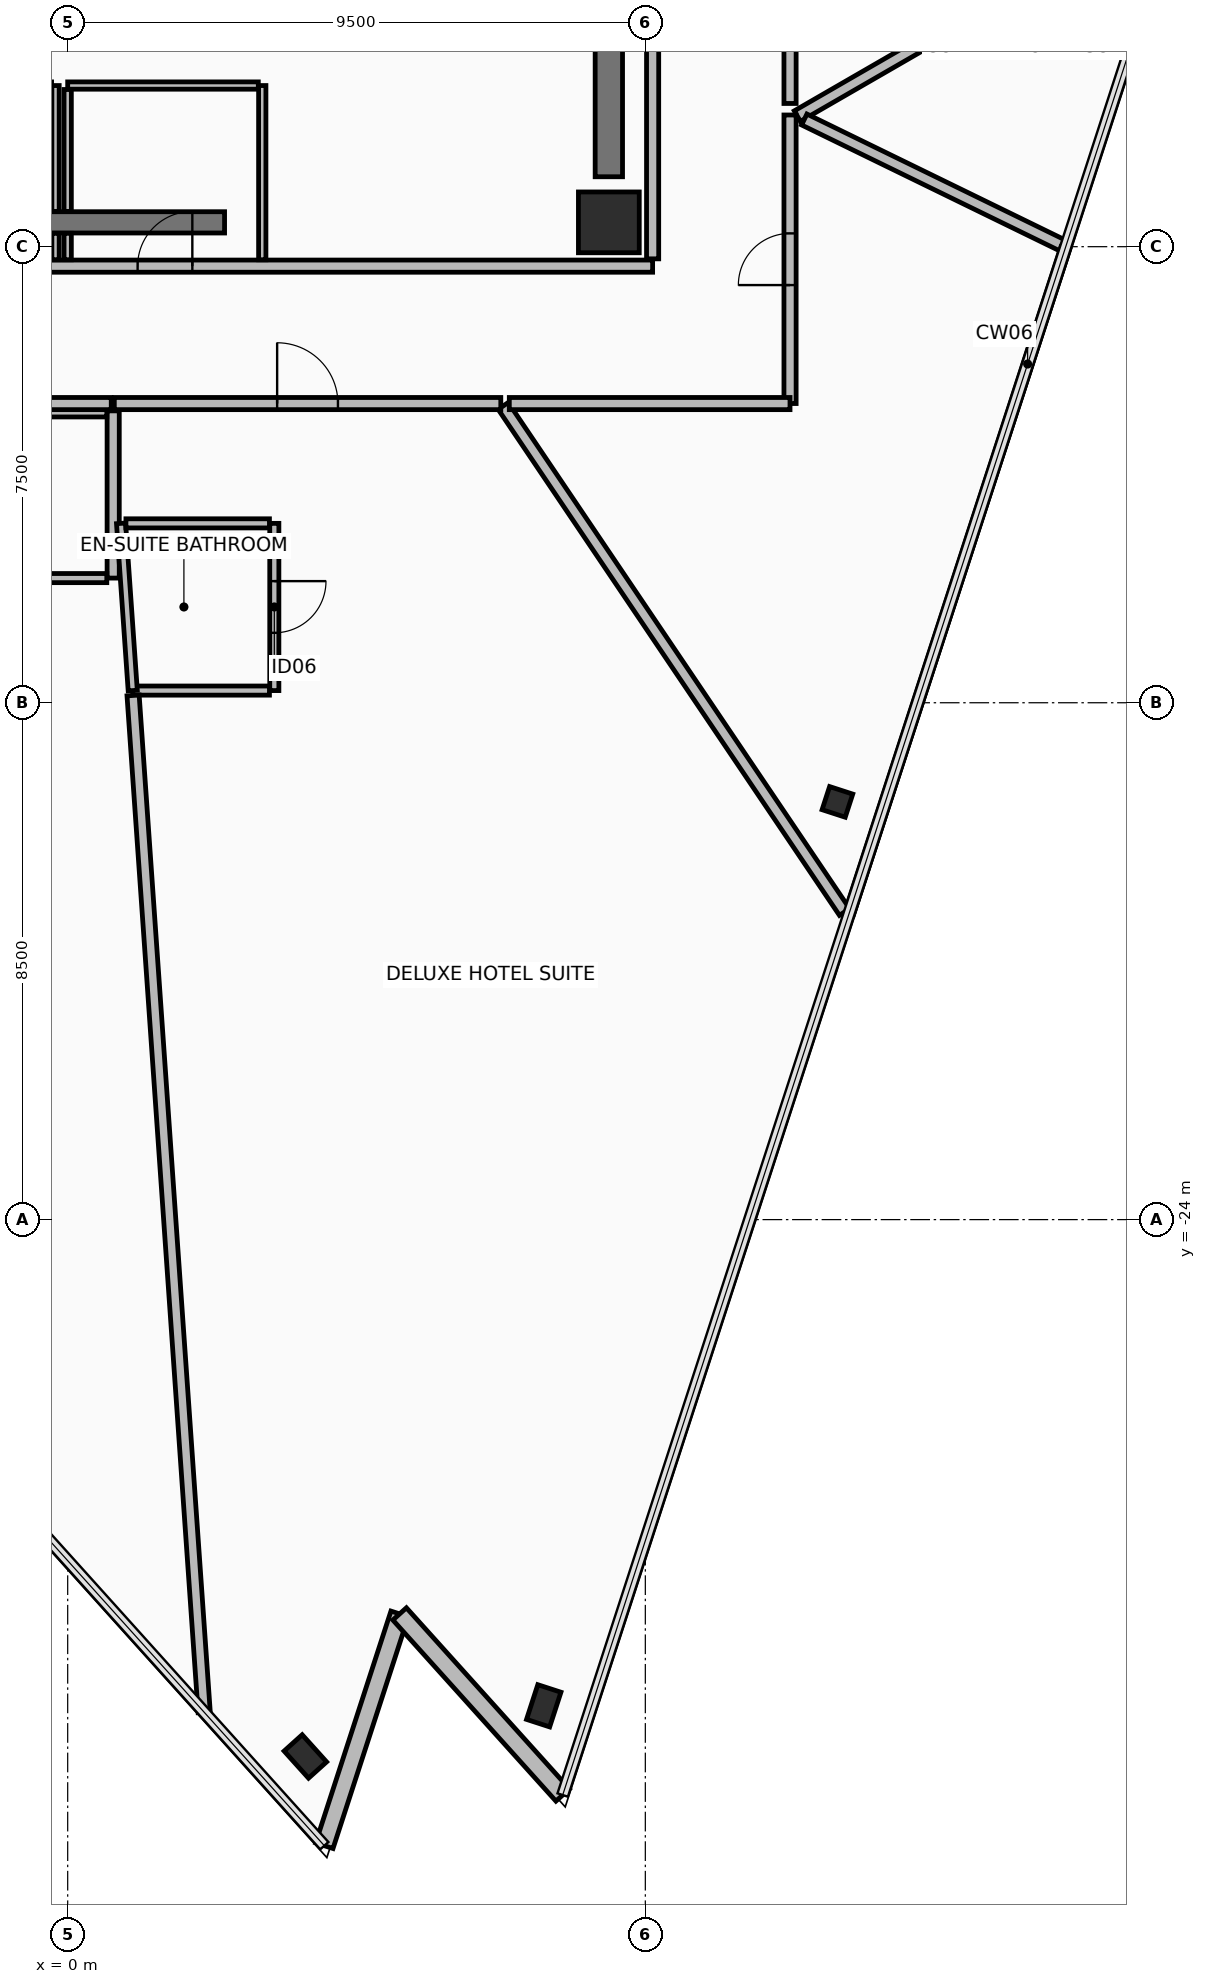
"""IFC4 building model, lengths in metres.
Left out: names, types, materials, properties, quantities, classifications, styles, units other than length and angle.
Written with IfcOpenShell. Run it as: python <this file> out.ifc"""

import sys

from ifc_helpers import new_model, si_unit, direction, frame, frame_2d, origin, origin_2d, place, context, subcontext, project, spatial, rectangle, hollow_rectangle, extrude, element, fill, save


model = new_model("IFC4")
c1 = context("Model", 3, precision=1e-05, world=origin(), true_north=direction((0.0, 1.0)))
c2 = subcontext(c1, "Body", "Model", "MODEL_VIEW")
j1 = project(units=[si_unit("LENGTHUNIT", "METRE"), si_unit("PLANEANGLEUNIT", "RADIAN")], contexts=[c1])
p1 = place(None, origin())
s1 = spatial("IfcSite", under=j1, at=p1, CompositionType="ELEMENT")
p2 = place(p1, origin())
s2 = spatial("IfcBuilding", under=s1, at=p2, CompositionType="ELEMENT")
p3 = place(p2, frame((0.0, 0.0, 287.05)))
s3 = spatial("IfcBuildingStorey", under=s2, at=p3, CompositionType="ELEMENT", Elevation=287.05)
p4 = place(p3, frame((8.9, -7.6, 0.0), z_axis=(0.0, 0.0, 1.0), x_axis=(1.0, 0.0, 0.0)))
e1 = element("IfcColumn", 1, at=p4, inside=s3, PredefinedType="COLUMN", context=c2, shape_type="SweptSolid", body=[
    extrude(rectangle(XDim=1.0, YDim=1.0, at=origin_2d()), origin(), (0.0, 0.0, 1.0), 3.65),
])
for number, where, z_axis, x_axis in (
    (2, (3.909, -32.829, 0.0), (0.0, 0.0, 1.0), (-0.669, 0.743, 0.0)),
    (3, (7.829, -31.996, 0.0), (0.0, 0.0, 1.0), (0.309, 0.951, 0.0)),
):
    element("IfcColumn", number, at=place(p3, frame(where, z_axis=z_axis, x_axis=x_axis)), inside=s3, PredefinedType="COLUMN", context=c2, shape_type="SweptSolid", body=[
        extrude(hollow_rectangle(XDim=0.4, YDim=0.6, WallThickness=0.03, at=origin_2d()), origin(), (0.0, 0.0, 1.0), 3.65),
    ])
p5 = place(p3, frame((12.659, -17.131, 0.0), z_axis=(0.0, 0.0, 1.0), x_axis=(0.309018654281, 0.951055976957, 0.0)))
e4 = element("IfcColumn", 4, at=p5, inside=s3, PredefinedType="COLUMN", context=c2, shape_type="SweptSolid", body=[
    extrude(hollow_rectangle(XDim=0.4, YDim=0.4, WallThickness=0.025, at=origin_2d()), origin(), (0.0, 0.0, 1.0), 3.65),
])
p6 = place(p3, frame((4.221, -34.296, 0.0), z_axis=(0.0, 0.0, 1.0), x_axis=(0.309018580232, 0.951056001018, 0.0)))
e5 = element("IfcWall", 5, at=p6, inside=s3, PredefinedType="STANDARD", context=c2, shape_type="SweptSolid", body=[
    extrude(rectangle(XDim=4.008, YDim=0.3, at=frame_2d((2.004, 0.0))), origin(), (0.0, 0.0, 1.0), 2.81),
])
p7 = place(p3, frame((5.459, -30.484, 0.0), z_axis=(0.0, 0.0, 1.0), x_axis=(0.669132983361, -0.743142685208, 0.0)))
e6 = element("IfcWall", 6, at=p7, inside=s3, PredefinedType="STANDARD", context=c2, shape_type="SweptSolid", body=[
    extrude(rectangle(XDim=4.008, YDim=0.3, at=frame_2d((2.004, 0.0))), origin(), (0.0, 0.0, 1.0), 2.81),
])
p8 = place(p3, frame((-2.8, -7.6, 0.0), z_axis=(0.0, 0.0, 1.0), x_axis=(1.0, 0.0, 0.0)))
e7 = element("IfcWall", 7, at=p8, inside=s3, PredefinedType="SHEAR", context=c2, shape_type="SweptSolid", body=[
    extrude(rectangle(XDim=5.38, YDim=0.35, at=frame_2d((2.69, 0.0))), origin(), (0.0, 0.0, 1.0), 3.465),
])
p9 = place(p3, frame((8.9, -6.85, 0.0), z_axis=(0.0, 0.0, 1.0), x_axis=(0.0, 1.0, 0.0)))
e8 = element("IfcWall", 8, at=p9, inside=s3, PredefinedType="SHEAR", context=c2, shape_type="SweptSolid", body=[
    extrude(rectangle(XDim=10.7, YDim=0.45, at=frame_2d((5.35, 0.0))), origin(), (0.0, 0.0, 1.0), 3.465),
])
p10 = place(p3, frame((-9.62, -8.32, 0.0), z_axis=(0.0, 0.0, 1.0), x_axis=(1.0, 0.0, 0.0)))
e9 = element("IfcWall", 9, at=p10, inside=s3, PredefinedType="PARTITIONING", context=c2, shape_type="SweptSolid", body=[
    extrude(rectangle(XDim=19.24, YDim=0.2, at=frame_2d((9.62, 0.0))), origin(), (0.0, 0.0, 1.0), 2.96),
])
p11 = place(p10, frame((7.37, 0.0, 0.0)))
e10 = element("IfcOpeningElement", 10, at=p11, cuts=e9, PredefinedType="OPENING", context=c2, shape_type="SweptSolid", body=[
    extrude(rectangle(XDim=0.9, YDim=2.1, at=frame_2d((0.45, 1.05))), frame((0.0, 0.11, 0.0), z_axis=(0.0, -1.0, 0.0), x_axis=(1.0, 0.0, 0.0)), (0.0, 0.0, 1.0), 0.22),
])
p12 = place(p10, frame((10.77, 0.0, 0.0)))
e11 = element("IfcOpeningElement", 11, at=p12, cuts=e9, PredefinedType="OPENING", context=c2, shape_type="SweptSolid", body=[
    extrude(rectangle(XDim=0.9, YDim=2.1, at=frame_2d((0.45, 1.05))), frame((0.0, 0.11, 0.0), z_axis=(0.0, -1.0, 0.0), x_axis=(1.0, 0.0, 0.0)), (0.0, 0.0, 1.0), 0.22),
])
p13 = place(p3, frame((9.62, -8.2, 0.0), z_axis=(0.0, 0.0, 1.0), x_axis=(0.0, 1.0, 0.0)))
e12 = element("IfcWall", 12, at=p13, inside=s3, PredefinedType="PARTITIONING", context=c2, shape_type="SweptSolid", body=[
    extrude(rectangle(XDim=16.4, YDim=0.2, at=frame_2d((8.2, 0.0))), origin(), (0.0, 0.0, 1.0), 2.96),
])
p14 = place(p13, frame((12.65, 0.0, 0.0)))
e13 = element("IfcOpeningElement", 13, at=p14, cuts=e12, PredefinedType="OPENING", context=c2, shape_type="SweptSolid", body=[
    extrude(rectangle(XDim=1.1, YDim=2.15, at=frame_2d((0.55, 1.075))), frame((0.0, 0.11, 0.0), z_axis=(0.0, -1.0, 0.0), x_axis=(1.0, 0.0, 0.0)), (0.0, 0.0, 1.0), 0.22),
])
p15 = place(p3, frame((-0.2, -8.215, 0.0), z_axis=(0.0, 0.0, 1.0), x_axis=(0.0, 1.0, 0.0)))
e14 = element("IfcWall", 14, at=p15, inside=s3, PredefinedType="PARTITIONING", context=c2, shape_type="SweptSolid", body=[
    extrude(rectangle(XDim=0.435, YDim=0.12, at=frame_2d((0.218, 0.0))), origin(), (0.0, 0.0, 1.0), 2.76),
])
p16 = place(p3, frame((-0.2, -7.42, 0.0), z_axis=(0.0, 0.0, 1.0), x_axis=(0.0, 1.0, 0.0)))
e15 = element("IfcWall", 15, at=p16, inside=s3, PredefinedType="PARTITIONING", context=c2, shape_type="SweptSolid", body=[
    extrude(rectangle(XDim=2.07, YDim=0.12, at=frame_2d((1.035, 0.0))), origin(), (0.0, 0.0, 1.0), 2.76),
])
p17 = place(p3, frame((3.2, -8.215, 0.0), z_axis=(0.0, 0.0, 1.0), x_axis=(0.0, 1.0, 0.0)))
e16 = element("IfcWall", 16, at=p17, inside=s3, PredefinedType="PARTITIONING", context=c2, shape_type="SweptSolid", body=[
    extrude(rectangle(XDim=2.865, YDim=0.12, at=frame_2d((1.433, 0.0))), origin(), (0.0, 0.0, 1.0), 2.76),
])
p18 = place(p3, frame((3.135, -5.35, 0.0), z_axis=(0.0, 0.0, 1.0), x_axis=(-1.0, 0.0, 0.0)))
e17 = element("IfcWall", 17, at=p18, inside=s3, PredefinedType="PARTITIONING", context=c2, shape_type="SweptSolid", body=[
    extrude(rectangle(XDim=3.135, YDim=0.12, at=frame_2d((1.567, 0.0))), origin(), (0.0, 0.0, 1.0), 3.465),
])
p19 = place(p3, frame((0.0, -5.415, 0.0), z_axis=(0.0, 0.0, 1.0), x_axis=(0.0, -1.0, 0.0)))
e18 = element("IfcWall", 18, at=p19, inside=s3, PredefinedType="PARTITIONING", context=c2, shape_type="SweptSolid", body=[
    extrude(rectangle(XDim=2.005, YDim=0.12, at=frame_2d((1.002, 0.0))), origin(), (0.0, 0.0, 1.0), 2.76),
])
p20 = place(p3, frame((0.0, -7.78, 0.0), z_axis=(0.0, 0.0, 1.0), x_axis=(0.0, -1.0, 0.0)))
e19 = element("IfcWall", 19, at=p20, inside=s3, PredefinedType="PARTITIONING", context=c2, shape_type="SweptSolid", body=[
    extrude(rectangle(XDim=0.435, YDim=0.12, at=frame_2d((0.218, 0.0))), origin(), (0.0, 0.0, 1.0), 2.76),
])
p21 = place(p3, frame((0.748, -10.7, 0.0), z_axis=(0.0, 0.0, 1.0), x_axis=(0.0, -1.0, 0.0)))
e20 = element("IfcWall", 20, at=p21, inside=s3, PredefinedType="PARTITIONING", context=c2, shape_type="SweptSolid", body=[
    extrude(rectangle(XDim=2.75, YDim=0.2, at=frame_2d((1.375, 0.0))), origin(), (0.0, 0.0, 1.0), 3.465),
])
p22 = place(p3, frame((0.643, -13.45, 0.0), z_axis=(0.0, 0.0, 1.0), x_axis=(-1.0, 0.0, 0.0)))
e21 = element("IfcWall", 21, at=p22, inside=s3, PredefinedType="PARTITIONING", context=c2, shape_type="SweptSolid", body=[
    extrude(rectangle(XDim=2.545, YDim=0.15, at=frame_2d((1.272, 0.0))), origin(), (0.0, 0.0, 1.0), 3.465),
])
p23 = place(p3, frame((-1.797, -10.7, 0.0), z_axis=(0.0, 0.0, 1.0), x_axis=(1.0, 0.0, 0.0)))
e22 = element("IfcWall", 22, at=p23, inside=s3, PredefinedType="PARTITIONING", context=c2, shape_type="SweptSolid", body=[
    extrude(rectangle(XDim=2.44, YDim=0.2, at=frame_2d((1.22, 0.0))), origin(), (0.0, 0.0, 1.0), 3.465),
])
p24 = place(p3, frame((3.398, -12.55, 0.0), z_axis=(0.0, 0.0, 1.0), x_axis=(0.0, -1.0, 0.0)))
e23 = element("IfcWall", 23, at=p24, inside=s3, PredefinedType="PARTITIONING", context=c2, shape_type="SweptSolid", body=[
    extrude(rectangle(XDim=2.75, YDim=0.15, at=frame_2d((1.375, 0.0))), origin(), (0.0, 0.0, 1.0), 3.465),
])
p25 = place(p24, frame((0.95, 0.0, 0.0)))
e24 = element("IfcOpeningElement", 24, at=p25, cuts=e23, PredefinedType="OPENING", context=c2, shape_type="SweptSolid", body=[
    extrude(rectangle(XDim=0.85, YDim=2.1, at=frame_2d((0.425, 1.05))), frame((0.0, 0.085, 0.0), z_axis=(0.0, -1.0, 0.0), x_axis=(1.0, 0.0, 0.0)), (0.0, 0.0, 1.0), 0.17),
])
p26 = place(p3, frame((3.318, -15.3, 0.0), z_axis=(0.0, 0.0, 1.0), x_axis=(-1.0, 0.0, 0.0)))
e25 = element("IfcWall", 25, at=p26, inside=s3, PredefinedType="PARTITIONING", context=c2, shape_type="SweptSolid", body=[
    extrude(rectangle(XDim=2.248, YDim=0.15, at=frame_2d((1.124, 0.0))), origin(), (0.0, 0.0, 1.0), 3.465),
])
p27 = place(p3, frame((1.07, -15.3, 0.0), z_axis=(0.0, 0.0, 1.0), x_axis=(-0.069698693715, 0.997568088952, 0.0)))
e26 = element("IfcWall", 26, at=p27, inside=s3, PredefinedType="PARTITIONING", context=c2, shape_type="SweptSolid", body=[
    extrude(rectangle(XDim=2.757, YDim=0.15, at=frame_2d((1.378, 0.0))), origin(), (0.0, 0.0, 1.0), 3.465),
])
p28 = place(p3, frame((0.958, -12.55, 0.0), z_axis=(0.0, 0.0, 1.0), x_axis=(1.0, 0.0, 0.0)))
e27 = element("IfcWall", 27, at=p28, inside=s3, PredefinedType="PARTITIONING", context=c2, shape_type="SweptSolid", body=[
    extrude(rectangle(XDim=2.36, YDim=0.15, at=frame_2d((1.18, 0.0))), origin(), (0.0, 0.0, 1.0), 3.465),
])
p29 = place(p3, frame((14.204, -4.58, 0.0), z_axis=(0.0, 0.0, 1.0), x_axis=(-0.866038622153, -0.499977104415, 0.0)))
e28 = element("IfcWall", 28, at=p29, inside=s3, PredefinedType="PARTITIONING", context=c2, shape_type="SweptSolid", body=[
    extrude(rectangle(XDim=2.545, YDim=0.2, at=frame_2d((1.272, 0.0))), origin(), (0.0, 0.0, 1.0), 2.96),
])
p30 = place(p3, frame((11.88, -5.645, 0.0), z_axis=(0.0, 0.0, 1.0), x_axis=(0.0, 1.0, 0.0)))
e29 = element("IfcWall", 29, at=p30, inside=s3, PredefinedType="PARTITIONING", context=c2, shape_type="SweptSolid", body=[
    extrude(rectangle(XDim=2.898, YDim=0.2, at=frame_2d((1.449, 0.0))), origin(), (0.0, 0.0, 1.0), 2.96),
])
p31 = place(p3, frame((11.88, -10.579, 0.0), z_axis=(0.0, 0.0, 1.0), x_axis=(0.0, 1.0, 0.0)))
e30 = element("IfcWall", 30, at=p31, inside=s3, PredefinedType="PARTITIONING", context=c2, shape_type="SweptSolid", body=[
    extrude(rectangle(XDim=4.745, YDim=0.2, at=frame_2d((2.373, 0.0))), origin(), (0.0, 0.0, 1.0), 2.96),
])
p32 = place(p31, frame((1.948, 0.0, 0.0)))
e31 = element("IfcOpeningElement", 31, at=p32, cuts=e30, PredefinedType="OPENING", context=c2, shape_type="SweptSolid", body=[
    extrude(rectangle(XDim=0.85, YDim=2.1, at=frame_2d((0.425, 1.05))), frame((0.0, 0.11, 0.0), z_axis=(0.0, -1.0, 0.0), x_axis=(1.0, 0.0, 0.0)), (0.0, 0.0, 1.0), 0.22),
])
p33 = place(p3, frame((12.114, -5.908, 0.0), z_axis=(0.0, 0.0, 1.0), x_axis=(0.898773373644, -0.438413529476, 0.0)))
e32 = element("IfcWall", 32, at=p33, inside=s3, PredefinedType="PARTITIONING", context=c2, shape_type="SweptSolid", body=[
    extrude(rectangle(XDim=4.761, YDim=0.2, at=frame_2d((2.381, 0.0))), origin(), (0.0, 0.0, 1.0), 2.81),
])
p34 = place(p3, frame((16.406, -8.026, 0.0), z_axis=(0.0, 0.0, 1.0), x_axis=(-0.309030454155, -0.951052142842, 0.0)))
e33 = element("IfcWall", 33, at=p34, inside=s3, PredefinedType="PARTITIONING", context=c2, shape_type="SweptSolid", body=[
    extrude(rectangle(XDim=11.514, YDim=0.15, at=frame_2d((5.757, 0.0))), origin(), (0.0, 0.0, 1.0), 3.465),
])
p35 = place(p3, frame((12.776, -18.941, 0.0), z_axis=(0.0, 0.0, 1.0), x_axis=(-0.559187933526, 0.829040924804, 0.0)))
e34 = element("IfcWall", 34, at=p35, inside=s3, PredefinedType="PARTITIONING", context=c2, shape_type="SweptSolid", body=[
    extrude(rectangle(XDim=10.038, YDim=0.2, at=frame_2d((5.019, 0.0))), origin(), (0.0, 0.0, 1.0), 2.81),
])
p36 = place(p3, frame((7.263, -10.58, 0.0), z_axis=(0.0, 0.0, 1.0), x_axis=(1.0, 0.0, 0.0)))
e35 = element("IfcWall", 35, at=p36, inside=s3, PredefinedType="PARTITIONING", context=c2, shape_type="SweptSolid", body=[
    extrude(rectangle(XDim=4.616, YDim=0.2, at=frame_2d((2.308, 0.0))), origin(), (0.0, 0.0, 1.0), 2.96),
])
p37 = place(p3, frame((-5.145, -10.58, 0.0), z_axis=(0.0, 0.0, 1.0), x_axis=(1.0, 0.0, 0.0)))
e36 = element("IfcWall", 36, at=p37, inside=s3, PredefinedType="PARTITIONING", context=c2, shape_type="SweptSolid", body=[
    extrude(rectangle(XDim=5.861, YDim=0.2, at=frame_2d((2.931, 0.0))), origin(), (0.0, 0.0, 1.0), 2.96),
])
p38 = place(p37, frame((2.151, 0.0, 0.0)))
e37 = element("IfcOpeningElement", 37, at=p38, cuts=e36, PredefinedType="OPENING", context=c2, shape_type="SweptSolid", body=[
    extrude(rectangle(XDim=1.0, YDim=2.15, at=frame_2d((0.5, 1.075))), frame((0.0, 0.11, 0.0), z_axis=(0.0, -1.0, 0.0), x_axis=(1.0, 0.0, 0.0)), (0.0, 0.0, 1.0), 0.22),
])
p39 = place(p3, frame((1.075, -15.38, 0.0), z_axis=(0.0, 0.0, 1.0), x_axis=(0.069765789378, -0.997563398804, 0.0)))
e38 = element("IfcWall", 38, at=p39, inside=s3, PredefinedType="PARTITIONING", context=c2, shape_type="SweptSolid", body=[
    extrude(rectangle(XDim=16.762, YDim=0.2, at=frame_2d((8.381, 0.0))), origin(), (0.0, 0.0, 1.0), 2.81),
])
p40 = place(p3, frame((0.767, -10.58, 0.0), z_axis=(0.0, 0.0, 1.0), x_axis=(1.0, 0.0, 0.0)))
e39 = element("IfcWall", 39, at=p40, inside=s3, PredefinedType="PARTITIONING", context=c2, shape_type="SweptSolid", body=[
    extrude(rectangle(XDim=6.356, YDim=0.2, at=frame_2d((3.178, 0.0))), origin(), (0.0, 0.0, 1.0), 3.465),
])
p41 = place(p40, frame((2.678, 0.0, 0.0)))
e40 = element("IfcOpeningElement", 40, at=p41, cuts=e39, PredefinedType="OPENING", context=c2, shape_type="SweptSolid", body=[
    extrude(rectangle(XDim=1.0, YDim=2.15, at=frame_2d((0.5, 1.075))), frame((0.0, 0.11, 0.0), z_axis=(0.0, -1.0, 0.0), x_axis=(1.0, 0.0, 0.0)), (0.0, 0.0, 1.0), 0.22),
])
p42 = place(p12, frame((0.9, 0.0, 0.0), z_axis=(0.0, 0.0, 1.0), x_axis=(-1.0, 0.0, 0.0)))
e41 = element("IfcDoor", 41, at=p42, inside=s3, OperationType="SINGLE_SWING_LEFT", PredefinedType="DOOR", context=c2, shape_type="SweptSolid", body=[
    extrude(rectangle(XDim=0.9, YDim=2.1, at=frame_2d((0.45, 1.05))), frame((0.0, 0.025, 0.0), z_axis=(0.0, -1.0, 0.0), x_axis=(1.0, 0.0, 0.0)), (0.0, 0.0, 1.0), 0.05),
])
fill(e11, e41)
p43 = place(p25, origin())
e42 = element("IfcDoor", 42, at=p43, inside=s3, OperationType="SINGLE_SWING_RIGHT", PredefinedType="DOOR", context=c2, shape_type="SweptSolid", body=[
    extrude(rectangle(XDim=0.85, YDim=2.1, at=frame_2d((0.425, 1.05))), frame((0.0, 0.025, 0.0), z_axis=(0.0, -1.0, 0.0), x_axis=(1.0, 0.0, 0.0)), (0.0, 0.0, 1.0), 0.05),
])
fill(e24, e42)
p44 = place(p32, origin())
e43 = element("IfcDoor", 43, at=p44, inside=s3, OperationType="SINGLE_SWING_RIGHT", PredefinedType="DOOR", context=c2, shape_type="SweptSolid", body=[
    extrude(rectangle(XDim=0.85, YDim=2.1, at=frame_2d((0.425, 1.05))), frame((0.0, 0.025, 0.0), z_axis=(0.0, -1.0, 0.0), x_axis=(1.0, 0.0, 0.0)), (0.0, 0.0, 1.0), 0.05),
])
fill(e31, e43)
p45 = place(p41, origin())
e44 = element("IfcDoor", 44, at=p45, inside=s3, OperationType="SINGLE_SWING_LEFT", PredefinedType="DOOR", context=c2, shape_type="SweptSolid", body=[
    extrude(rectangle(XDim=1.0, YDim=2.15, at=frame_2d((0.5, 1.075))), frame((0.0, 0.025, 0.0), z_axis=(0.0, -1.0, 0.0), x_axis=(1.0, 0.0, 0.0)), (0.0, 0.0, 1.0), 0.05),
])
fill(e40, e44)
save(model, sys.argv[1])
